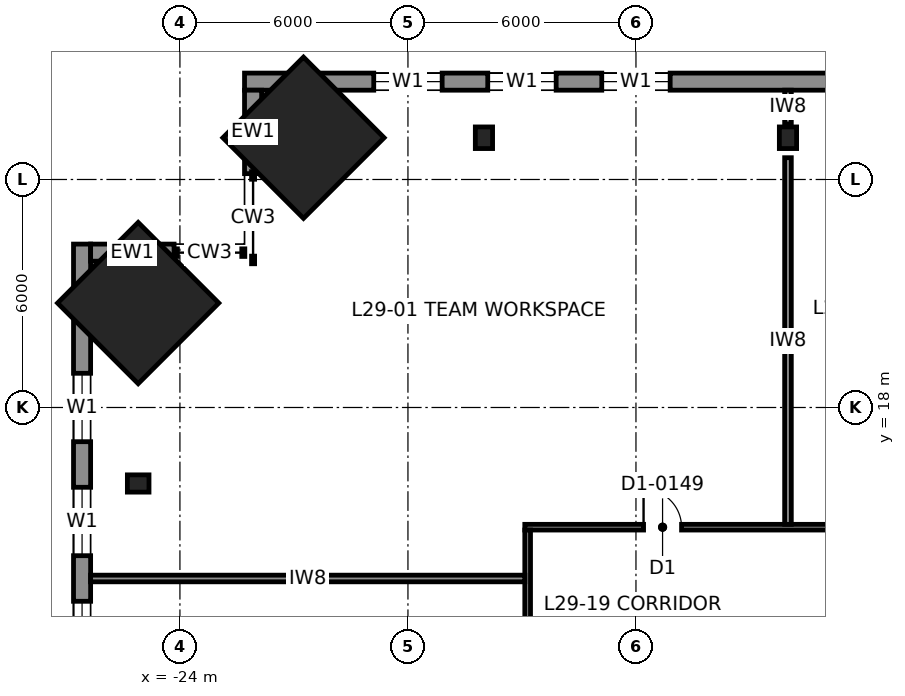
"""IFC4 building model, lengths in metres.
Left out: names, types, materials, properties, quantities, classifications, styles, units other than length and angle.
Written with IfcOpenShell. Run it as: python <this file> out.ifc"""

import sys

from ifc_helpers import new_model, si_unit, direction, frame, frame_2d, origin, origin_2d, place, context, subcontext, project, spatial, rectangle, i_section, extrude, element, fill, save


model = new_model("IFC4")
c1 = context("Model", 3, precision=1e-05, world=origin(), true_north=direction((0.0, 1.0)))
c2 = subcontext(c1, "Body", "Model", "MODEL_VIEW")
j1 = project(units=[si_unit("LENGTHUNIT", "METRE"), si_unit("PLANEANGLEUNIT", "RADIAN")], contexts=[c1])
p1 = place(None, origin())
s1 = spatial("IfcSite", under=j1, at=p1, CompositionType="ELEMENT")
p2 = place(p1, origin())
s2 = spatial("IfcBuilding", under=s1, at=p2, CompositionType="ELEMENT")
p3 = place(p2, frame((0.0, 0.0, 143.8)))
s3 = spatial("IfcBuildingStorey", under=s2, at=p3, CompositionType="ELEMENT", Elevation=143.8)
for number, where, z_axis, x_axis in (
    (1, (-25.098, 20.748, 0.0), (0.04, -0.04, 0.998), (0.707, 0.708, 0.0)),
    (2, (-20.748, 25.098, 0.0), (0.04, -0.04, 0.998), (0.708, 0.707, 0.0)),
):
    element("IfcColumn", number, at=place(p3, frame(where, z_axis=z_axis, x_axis=x_axis)), inside=s3, PredefinedType="COLUMN", context=c2, shape_type="SweptSolid", body=[
        extrude(rectangle(XDim=3.0, YDim=3.0, at=origin_2d()), origin(), (0.0, 0.0, 1.0), 4.007),
    ])
for number, where, z_axis, x_axis in (
    (3, (-8.0, 25.098, 0.0), (0.0, -0.04, 0.999), (1.0, 0.0, 0.0)),
    (4, (-16.0, 25.098, 0.0), (0.0, -0.04, 0.999), (1.0, 0.0, 0.0)),
    (5, (-25.098, 16.0, 0.0), (0.04, 0.0, 0.999), (0.0, 1.0, 0.0)),
):
    element("IfcColumn", number, at=place(p3, frame(where, z_axis=z_axis, x_axis=x_axis)), inside=s3, PredefinedType="COLUMN", context=c2, shape_type="SweptSolid", body=[
        extrude(i_section(OverallWidth=0.454, OverallDepth=0.569, WebThickness=0.078, FlangeThickness=0.125, at=origin_2d()), origin(), (0.0, 0.0, 1.0), 4.003),
    ])
p4 = place(p3, frame((22.3, 26.575, 0.0), z_axis=(0.0, 0.0, 1.0), x_axis=(-1.0, 0.0, 0.0)))
e6 = element("IfcWall", 6, at=p4, inside=s3, PredefinedType="SOLIDWALL", context=c2, shape_type="SweptSolid", body=[
    extrude(rectangle(XDim=44.6, YDim=0.45, at=frame_2d((22.3, 0.0))), origin(), (0.0, 0.0, 1.0), 3.83),
])
p5 = place(p4, frame((3.4, 0.0, 0.7)))
e7 = element("IfcOpeningElement", 7, at=p5, cuts=e6, PredefinedType="OPENING", context=c2, shape_type="SweptSolid", body=[
    extrude(rectangle(XDim=1.8, YDim=2.6, at=frame_2d((0.9, 1.3))), frame((0.0, 0.235, 0.0), z_axis=(0.0, -1.0, 0.0), x_axis=(1.0, 0.0, 0.0)), (0.0, 0.0, 1.0), 0.47),
])
p6 = place(p4, frame((6.4, 0.0, 0.7)))
e8 = element("IfcOpeningElement", 8, at=p6, cuts=e6, PredefinedType="OPENING", context=c2, shape_type="SweptSolid", body=[
    extrude(rectangle(XDim=1.8, YDim=2.6, at=frame_2d((0.9, 1.3))), frame((0.0, 0.235, 0.0), z_axis=(0.0, -1.0, 0.0), x_axis=(1.0, 0.0, 0.0)), (0.0, 0.0, 1.0), 0.47),
])
p7 = place(p4, frame((9.4, 0.0, 0.7)))
e9 = element("IfcOpeningElement", 9, at=p7, cuts=e6, PredefinedType="OPENING", context=c2, shape_type="SweptSolid", body=[
    extrude(rectangle(XDim=1.8, YDim=2.6, at=frame_2d((0.9, 1.3))), frame((0.0, 0.235, 0.0), z_axis=(0.0, -1.0, 0.0), x_axis=(1.0, 0.0, 0.0)), (0.0, 0.0, 1.0), 0.47),
])
p8 = place(p4, frame((15.4, 0.0, 0.7)))
e10 = element("IfcOpeningElement", 10, at=p8, cuts=e6, PredefinedType="OPENING", context=c2, shape_type="SweptSolid", body=[
    extrude(rectangle(XDim=1.8, YDim=2.6, at=frame_2d((0.9, 1.3))), frame((0.0, 0.235, 0.0), z_axis=(0.0, -1.0, 0.0), x_axis=(1.0, 0.0, 0.0)), (0.0, 0.0, 1.0), 0.47),
])
p9 = place(p4, frame((18.4, 0.0, 0.7)))
e11 = element("IfcOpeningElement", 11, at=p9, cuts=e6, PredefinedType="OPENING", context=c2, shape_type="SweptSolid", body=[
    extrude(rectangle(XDim=1.8, YDim=2.6, at=frame_2d((0.9, 1.3))), frame((0.0, 0.235, 0.0), z_axis=(0.0, -1.0, 0.0), x_axis=(1.0, 0.0, 0.0)), (0.0, 0.0, 1.0), 0.47),
])
p10 = place(p4, frame((24.4, 0.0, 0.7)))
e12 = element("IfcOpeningElement", 12, at=p10, cuts=e6, PredefinedType="OPENING", context=c2, shape_type="SweptSolid", body=[
    extrude(rectangle(XDim=1.8, YDim=2.6, at=frame_2d((0.9, 1.3))), frame((0.0, 0.235, 0.0), z_axis=(0.0, -1.0, 0.0), x_axis=(1.0, 0.0, 0.0)), (0.0, 0.0, 1.0), 0.47),
])
p11 = place(p4, frame((27.4, 0.0, 0.7)))
e13 = element("IfcOpeningElement", 13, at=p11, cuts=e6, PredefinedType="OPENING", context=c2, shape_type="SweptSolid", body=[
    extrude(rectangle(XDim=1.8, YDim=2.6, at=frame_2d((0.9, 1.3))), frame((0.0, 0.235, 0.0), z_axis=(0.0, -1.0, 0.0), x_axis=(1.0, 0.0, 0.0)), (0.0, 0.0, 1.0), 0.47),
])
p12 = place(p4, frame((33.4, 0.0, 0.7)))
e14 = element("IfcOpeningElement", 14, at=p12, cuts=e6, PredefinedType="OPENING", context=c2, shape_type="SweptSolid", body=[
    extrude(rectangle(XDim=1.8, YDim=2.6, at=frame_2d((0.9, 1.3))), frame((0.0, 0.235, 0.0), z_axis=(0.0, -1.0, 0.0), x_axis=(1.0, 0.0, 0.0)), (0.0, 0.0, 1.0), 0.47),
])
p13 = place(p4, frame((36.4, 0.0, 0.7)))
e15 = element("IfcOpeningElement", 15, at=p13, cuts=e6, PredefinedType="OPENING", context=c2, shape_type="SweptSolid", body=[
    extrude(rectangle(XDim=1.8, YDim=2.6, at=frame_2d((0.9, 1.3))), frame((0.0, 0.235, 0.0), z_axis=(0.0, -1.0, 0.0), x_axis=(1.0, 0.0, 0.0)), (0.0, 0.0, 1.0), 0.47),
])
p14 = place(p4, frame((39.4, 0.0, 0.7)))
e16 = element("IfcOpeningElement", 16, at=p14, cuts=e6, PredefinedType="OPENING", context=c2, shape_type="SweptSolid", body=[
    extrude(rectangle(XDim=1.8, YDim=2.6, at=frame_2d((0.9, 1.3))), frame((0.0, 0.235, 0.0), z_axis=(0.0, -1.0, 0.0), x_axis=(1.0, 0.0, 0.0)), (0.0, 0.0, 1.0), 0.47),
])
p15 = place(p3, frame((-26.575, 22.3, 0.0), z_axis=(0.0, 0.0, 1.0), x_axis=(0.0, -1.0, 0.0)))
e17 = element("IfcWall", 17, at=p15, inside=s3, PredefinedType="SOLIDWALL", context=c2, shape_type="SweptSolid", body=[
    extrude(rectangle(XDim=44.6, YDim=0.45, at=frame_2d((22.3, 0.0))), origin(), (0.0, 0.0, 1.0), 3.83),
])
p16 = place(p15, frame((3.4, 0.0, 0.7)))
e18 = element("IfcOpeningElement", 18, at=p16, cuts=e17, PredefinedType="OPENING", context=c2, shape_type="SweptSolid", body=[
    extrude(rectangle(XDim=1.8, YDim=2.6, at=frame_2d((0.9, 1.3))), frame((0.0, 0.235, 0.0), z_axis=(0.0, -1.0, 0.0), x_axis=(1.0, 0.0, 0.0)), (0.0, 0.0, 1.0), 0.47),
])
p17 = place(p15, frame((6.4, 0.0, 0.7)))
e19 = element("IfcOpeningElement", 19, at=p17, cuts=e17, PredefinedType="OPENING", context=c2, shape_type="SweptSolid", body=[
    extrude(rectangle(XDim=1.8, YDim=2.6, at=frame_2d((0.9, 1.3))), frame((0.0, 0.235, 0.0), z_axis=(0.0, -1.0, 0.0), x_axis=(1.0, 0.0, 0.0)), (0.0, 0.0, 1.0), 0.47),
])
p18 = place(p15, frame((9.4, 0.0, 0.7)))
e20 = element("IfcOpeningElement", 20, at=p18, cuts=e17, PredefinedType="OPENING", context=c2, shape_type="SweptSolid", body=[
    extrude(rectangle(XDim=1.8, YDim=2.6, at=frame_2d((0.9, 1.3))), frame((0.0, 0.235, 0.0), z_axis=(0.0, -1.0, 0.0), x_axis=(1.0, 0.0, 0.0)), (0.0, 0.0, 1.0), 0.47),
])
p19 = place(p15, frame((15.4, 0.0, 0.7)))
e21 = element("IfcOpeningElement", 21, at=p19, cuts=e17, PredefinedType="OPENING", context=c2, shape_type="SweptSolid", body=[
    extrude(rectangle(XDim=1.8, YDim=2.6, at=frame_2d((0.9, 1.3))), frame((0.0, 0.235, 0.0), z_axis=(0.0, -1.0, 0.0), x_axis=(1.0, 0.0, 0.0)), (0.0, 0.0, 1.0), 0.47),
])
p20 = place(p15, frame((18.4, 0.0, 0.7)))
e22 = element("IfcOpeningElement", 22, at=p20, cuts=e17, PredefinedType="OPENING", context=c2, shape_type="SweptSolid", body=[
    extrude(rectangle(XDim=1.8, YDim=2.6, at=frame_2d((0.9, 1.3))), frame((0.0, 0.235, 0.0), z_axis=(0.0, -1.0, 0.0), x_axis=(1.0, 0.0, 0.0)), (0.0, 0.0, 1.0), 0.47),
])
p21 = place(p15, frame((24.4, 0.0, 0.7)))
e23 = element("IfcOpeningElement", 23, at=p21, cuts=e17, PredefinedType="OPENING", context=c2, shape_type="SweptSolid", body=[
    extrude(rectangle(XDim=1.8, YDim=2.6, at=frame_2d((0.9, 1.3))), frame((0.0, 0.235, 0.0), z_axis=(0.0, -1.0, 0.0), x_axis=(1.0, 0.0, 0.0)), (0.0, 0.0, 1.0), 0.47),
])
p22 = place(p15, frame((27.4, 0.0, 0.7)))
e24 = element("IfcOpeningElement", 24, at=p22, cuts=e17, PredefinedType="OPENING", context=c2, shape_type="SweptSolid", body=[
    extrude(rectangle(XDim=1.8, YDim=2.6, at=frame_2d((0.9, 1.3))), frame((0.0, 0.235, 0.0), z_axis=(0.0, -1.0, 0.0), x_axis=(1.0, 0.0, 0.0)), (0.0, 0.0, 1.0), 0.47),
])
p23 = place(p15, frame((33.4, 0.0, 0.7)))
e25 = element("IfcOpeningElement", 25, at=p23, cuts=e17, PredefinedType="OPENING", context=c2, shape_type="SweptSolid", body=[
    extrude(rectangle(XDim=1.8, YDim=2.6, at=frame_2d((0.9, 1.3))), frame((0.0, 0.235, 0.0), z_axis=(0.0, -1.0, 0.0), x_axis=(1.0, 0.0, 0.0)), (0.0, 0.0, 1.0), 0.47),
])
p24 = place(p15, frame((36.4, 0.0, 0.7)))
e26 = element("IfcOpeningElement", 26, at=p24, cuts=e17, PredefinedType="OPENING", context=c2, shape_type="SweptSolid", body=[
    extrude(rectangle(XDim=1.8, YDim=2.6, at=frame_2d((0.9, 1.3))), frame((0.0, 0.235, 0.0), z_axis=(0.0, -1.0, 0.0), x_axis=(1.0, 0.0, 0.0)), (0.0, 0.0, 1.0), 0.47),
])
p25 = place(p15, frame((39.4, 0.0, 0.7)))
e27 = element("IfcOpeningElement", 27, at=p25, cuts=e17, PredefinedType="OPENING", context=c2, shape_type="SweptSolid", body=[
    extrude(rectangle(XDim=1.8, YDim=2.6, at=frame_2d((0.9, 1.3))), frame((0.0, 0.235, 0.0), z_axis=(0.0, -1.0, 0.0), x_axis=(1.0, 0.0, 0.0)), (0.0, 0.0, 1.0), 0.47),
])
for number, where, z_axis, x_axis in (
    (28, (-22.075, 24.154, 0.0), (0.0, 0.0, 1.0), (0.0, 1.0, 0.0)),
    (29, (-24.154, 22.075, 0.0), (0.0, 0.0, 1.0), (-1.0, 0.0, 0.0)),
):
    element("IfcWall", number, at=place(p3, frame(where, z_axis=z_axis, x_axis=x_axis)), inside=s3, PredefinedType="SOLIDWALL", context=c2, shape_type="SweptSolid", body=[
        extrude(rectangle(XDim=2.197, YDim=0.45, at=frame_2d((1.098, 0.0))), origin(), (0.0, 0.0, 1.0), 3.83),
    ])
p26 = place(p3, frame((-14.925, 14.85, 0.0), z_axis=(0.0, 0.0, 1.0), x_axis=(1.0, 0.0, 0.0)))
e30 = element("IfcWall", 30, at=p26, inside=s3, PredefinedType="PARTITIONING", context=c2, shape_type="SweptSolid", body=[
    extrude(rectangle(XDim=29.85, YDim=0.15, at=frame_2d((14.925, 0.0))), origin(), (0.0, 0.0, 1.0), 3.83),
])
p27 = place(p26, frame((3.125, 0.0, 0.0)))
e31 = element("IfcOpeningElement", 31, at=p27, cuts=e30, PredefinedType="OPENING", context=c2, shape_type="SweptSolid", body=[
    extrude(rectangle(XDim=1.0, YDim=2.3, at=frame_2d((0.5, 1.15))), frame((0.0, 0.085, 0.0), z_axis=(0.0, -1.0, 0.0), x_axis=(1.0, 0.0, 0.0)), (0.0, 0.0, 1.0), 0.17),
])
p28 = place(p26, frame((10.425, 0.0, 0.0)))
e32 = element("IfcOpeningElement", 32, at=p28, cuts=e30, PredefinedType="OPENING", context=c2, shape_type="SweptSolid", body=[
    extrude(rectangle(XDim=1.0, YDim=2.3, at=frame_2d((0.5, 1.15))), frame((0.0, 0.085, 0.0), z_axis=(0.0, -1.0, 0.0), x_axis=(1.0, 0.0, 0.0)), (0.0, 0.0, 1.0), 0.17),
])
p29 = place(p26, frame((16.675, 0.0, 0.0)))
e33 = element("IfcOpeningElement", 33, at=p29, cuts=e30, PredefinedType="OPENING", context=c2, shape_type="SweptSolid", body=[
    extrude(rectangle(XDim=1.0, YDim=2.3, at=frame_2d((0.5, 1.15))), frame((0.0, 0.085, 0.0), z_axis=(0.0, -1.0, 0.0), x_axis=(1.0, 0.0, 0.0)), (0.0, 0.0, 1.0), 0.17),
])
p30 = place(p26, frame((24.025, 0.0, 0.0)))
e34 = element("IfcOpeningElement", 34, at=p30, cuts=e30, PredefinedType="OPENING", context=c2, shape_type="SweptSolid", body=[
    extrude(rectangle(XDim=1.0, YDim=2.3, at=frame_2d((0.5, 1.15))), frame((0.0, 0.085, 0.0), z_axis=(0.0, -1.0, 0.0), x_axis=(1.0, 0.0, 0.0)), (0.0, 0.0, 1.0), 0.17),
])
p31 = place(p3, frame((-14.85, 14.775, 0.0), z_axis=(0.0, 0.0, 1.0), x_axis=(0.0, -1.0, 0.0)))
e35 = element("IfcWall", 35, at=p31, inside=s3, PredefinedType="PARTITIONING", context=c2, shape_type="SweptSolid", body=[
    extrude(rectangle(XDim=28.35, YDim=0.15, at=frame_2d((14.175, 0.0))), origin(), (0.0, 0.0, 1.0), 3.83),
])
p32 = place(p31, frame((24.175, 0.0, 0.0)))
e36 = element("IfcOpeningElement", 36, at=p32, cuts=e35, PredefinedType="OPENING", context=c2, shape_type="SweptSolid", body=[
    extrude(rectangle(XDim=1.0, YDim=2.3, at=frame_2d((0.5, 1.15))), frame((0.0, 0.085, 0.0), z_axis=(0.0, -1.0, 0.0), x_axis=(1.0, 0.0, 0.0)), (0.0, 0.0, 1.0), 0.17),
])
p33 = place(p31, frame((20.975, 0.0, 0.0)))
e37 = element("IfcOpeningElement", 37, at=p33, cuts=e35, PredefinedType="OPENING", context=c2, shape_type="SweptSolid", body=[
    extrude(rectangle(XDim=1.0, YDim=2.3, at=frame_2d((0.5, 1.15))), frame((0.0, 0.085, 0.0), z_axis=(0.0, -1.0, 0.0), x_axis=(1.0, 0.0, 0.0)), (0.0, 0.0, 1.0), 0.17),
])
p34 = place(p31, frame((7.825, 0.0, 0.0)))
e38 = element("IfcOpeningElement", 38, at=p34, cuts=e35, PredefinedType="OPENING", context=c2, shape_type="SweptSolid", body=[
    extrude(rectangle(XDim=1.0, YDim=2.3, at=frame_2d((0.5, 1.15))), frame((0.0, 0.085, 0.0), z_axis=(0.0, -1.0, 0.0), x_axis=(1.0, 0.0, 0.0)), (0.0, 0.0, 1.0), 0.17),
])
p35 = place(p31, frame((3.625, 0.0, 0.0)))
e39 = element("IfcOpeningElement", 39, at=p35, cuts=e35, PredefinedType="OPENING", context=c2, shape_type="SweptSolid", body=[
    extrude(rectangle(XDim=1.0, YDim=2.3, at=frame_2d((0.5, 1.15))), frame((0.0, 0.085, 0.0), z_axis=(0.0, -1.0, 0.0), x_axis=(1.0, 0.0, 0.0)), (0.0, 0.0, 1.0), 0.17),
])
p36 = place(p31, frame((10.775, 0.0, 0.0)))
e40 = element("IfcOpeningElement", 40, at=p36, cuts=e35, PredefinedType="OPENING", context=c2, shape_type="SweptSolid", body=[
    extrude(rectangle(XDim=1.0, YDim=2.3, at=frame_2d((0.5, 1.15))), frame((0.0, 0.085, 0.0), z_axis=(0.0, -1.0, 0.0), x_axis=(1.0, 0.0, 0.0)), (0.0, 0.0, 1.0), 0.17),
])
p37 = place(p31, frame((17.775, 0.0, 0.0)))
e41 = element("IfcOpeningElement", 41, at=p37, cuts=e35, PredefinedType="OPENING", context=c2, shape_type="SweptSolid", body=[
    extrude(rectangle(XDim=1.0, YDim=2.3, at=frame_2d((0.5, 1.15))), frame((0.0, 0.085, 0.0), z_axis=(0.0, -1.0, 0.0), x_axis=(1.0, 0.0, 0.0)), (0.0, 0.0, 1.0), 0.17),
])
p38 = place(p3, frame((-26.35, 13.5, 0.0), z_axis=(0.0, 0.0, 1.0), x_axis=(1.0, 0.0, 0.0)))
e42 = element("IfcWall", 42, at=p38, inside=s3, PredefinedType="PARTITIONING", context=c2, shape_type="SweptSolid", body=[
    extrude(rectangle(XDim=11.425, YDim=0.175, at=frame_2d((5.712, 0.0))), origin(), (0.0, 0.0, 1.0), 3.83),
])
p39 = place(p3, frame((-8.0, 14.925, 0.0), z_axis=(0.0, 0.0, 1.0), x_axis=(0.0, 1.0, 0.0)))
e43 = element("IfcWall", 43, at=p39, inside=s3, PredefinedType="PARTITIONING", context=c2, shape_type="SweptSolid", body=[
    extrude(rectangle(XDim=9.648, YDim=0.175, at=frame_2d((4.824, 0.0))), origin(), (0.0, 0.0, 1.0), 2.83),
])
p40 = place(p3, frame((-8.0, 25.462, 0.0), z_axis=(0.0, 0.0, 1.0), x_axis=(0.0, 1.0, 0.0)))
e44 = element("IfcWall", 44, at=p40, inside=s3, PredefinedType="PARTITIONING", context=c2, shape_type="SweptSolid", body=[
    extrude(rectangle(XDim=0.888, YDim=0.175, at=frame_2d((0.444, 0.0))), origin(), (0.0, 0.0, 1.0), 3.83),
])
p41 = place(p12, origin())
e45 = element("IfcWindow", 45, at=p41, inside=s3, PartitioningType="SINGLE_PANEL", PredefinedType="WINDOW", context=c2, shape_type="SweptSolid", body=[
    extrude(rectangle(XDim=1.8, YDim=2.6, at=frame_2d((0.9, 1.3))), frame((0.0, 0.03, 0.0), z_axis=(0.0, -1.0, 0.0), x_axis=(1.0, 0.0, 0.0)), (0.0, 0.0, 1.0), 0.06),
])
fill(e14, e45)
p42 = place(p13, origin())
e46 = element("IfcWindow", 46, at=p42, inside=s3, PartitioningType="SINGLE_PANEL", PredefinedType="WINDOW", context=c2, shape_type="SweptSolid", body=[
    extrude(rectangle(XDim=1.8, YDim=2.6, at=frame_2d((0.9, 1.3))), frame((0.0, 0.03, 0.0), z_axis=(0.0, -1.0, 0.0), x_axis=(1.0, 0.0, 0.0)), (0.0, 0.0, 1.0), 0.06),
])
fill(e15, e46)
p43 = place(p14, origin())
e47 = element("IfcWindow", 47, at=p43, inside=s3, PartitioningType="SINGLE_PANEL", PredefinedType="WINDOW", context=c2, shape_type="SweptSolid", body=[
    extrude(rectangle(XDim=1.8, YDim=2.6, at=frame_2d((0.9, 1.3))), frame((0.0, 0.03, 0.0), z_axis=(0.0, -1.0, 0.0), x_axis=(1.0, 0.0, 0.0)), (0.0, 0.0, 1.0), 0.06),
])
fill(e16, e47)
p44 = place(p16, origin())
e48 = element("IfcWindow", 48, at=p44, inside=s3, PartitioningType="SINGLE_PANEL", PredefinedType="WINDOW", context=c2, shape_type="SweptSolid", body=[
    extrude(rectangle(XDim=1.8, YDim=2.6, at=frame_2d((0.9, 1.3))), frame((0.0, 0.03, 0.0), z_axis=(0.0, -1.0, 0.0), x_axis=(1.0, 0.0, 0.0)), (0.0, 0.0, 1.0), 0.06),
])
fill(e18, e48)
p45 = place(p17, origin())
e49 = element("IfcWindow", 49, at=p45, inside=s3, PartitioningType="SINGLE_PANEL", PredefinedType="WINDOW", context=c2, shape_type="SweptSolid", body=[
    extrude(rectangle(XDim=1.8, YDim=2.6, at=frame_2d((0.9, 1.3))), frame((0.0, 0.03, 0.0), z_axis=(0.0, -1.0, 0.0), x_axis=(1.0, 0.0, 0.0)), (0.0, 0.0, 1.0), 0.06),
])
fill(e19, e49)
p46 = place(p18, origin())
e50 = element("IfcWindow", 50, at=p46, inside=s3, PartitioningType="SINGLE_PANEL", PredefinedType="WINDOW", context=c2, shape_type="SweptSolid", body=[
    extrude(rectangle(XDim=1.8, YDim=2.6, at=frame_2d((0.9, 1.3))), frame((0.0, 0.03, 0.0), z_axis=(0.0, -1.0, 0.0), x_axis=(1.0, 0.0, 0.0)), (0.0, 0.0, 1.0), 0.06),
])
fill(e20, e50)
p47 = place(p27, origin())
e51 = element("IfcDoor", 51, at=p47, inside=s3, OperationType="SINGLE_SWING_LEFT", PredefinedType="DOOR", context=c2, shape_type="SweptSolid", body=[
    extrude(rectangle(XDim=1.0, YDim=2.3, at=frame_2d((0.5, 1.15))), frame((0.0, 0.025, 0.0), z_axis=(0.0, -1.0, 0.0), x_axis=(1.0, 0.0, 0.0)), (0.0, 0.0, 1.0), 0.05),
])
fill(e31, e51)
save(model, sys.argv[1])
